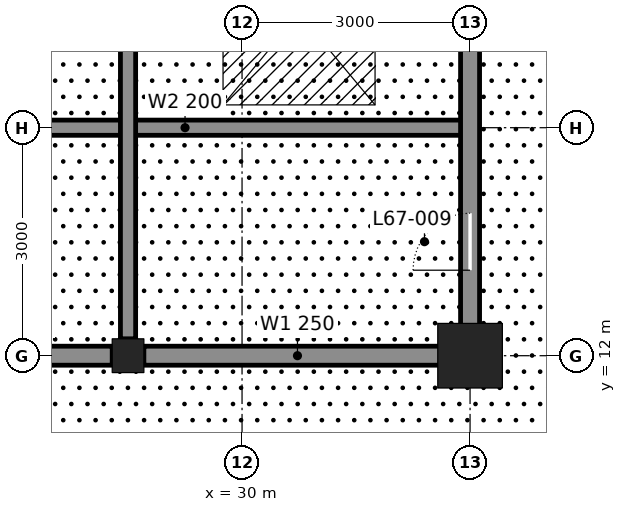
"""IFC4 building model, lengths in metres.
Left out: names, types, materials, properties, quantities, classifications, styles, units other than length and angle.
Written with IfcOpenShell. Run it as: python <this file> out.ifc"""

import sys

from ifc_helpers import new_model, si_unit, direction, frame, frame_2d, origin, origin_2d, place, context, subcontext, project, spatial, rectangle, hollow_rectangle, i_section, extrude, element, fill, save


model = new_model("IFC4")
c1 = context("Model", 3, precision=1e-05, world=origin(), true_north=direction((0.0, 1.0)))
c2 = subcontext(c1, "Body", "Model", "MODEL_VIEW")
j1 = project(units=[si_unit("LENGTHUNIT", "METRE"), si_unit("PLANEANGLEUNIT", "RADIAN")], contexts=[c1])
p1 = place(None, origin())
s1 = spatial("IfcSite", under=j1, at=p1, CompositionType="ELEMENT")
p2 = place(p1, origin())
s2 = spatial("IfcBuilding", under=s1, at=p2, CompositionType="ELEMENT")
p3 = place(p2, frame((0.0, 0.0, 300.0)))
s3 = spatial("IfcBuildingStorey", under=s2, at=p3, CompositionType="ELEMENT", Elevation=300.0)
p4 = place(p3, frame((28.5, 12.0, 0.0), z_axis=(0.0, 0.0, 1.0), x_axis=(1.0, 0.0, 0.0)))
e1 = element("IfcColumn", 1, at=p4, inside=s3, PredefinedType="COLUMN", context=c2, shape_type="SweptSolid", body=[
    extrude(i_section(OverallWidth=0.417, OverallDepth=0.445, WebThickness=0.039, FlangeThickness=0.063, at=origin_2d()), origin(), (0.0, 0.0, 1.0), 6.0),
])
p5 = place(p3, frame((33.0, 12.0, 0.0), z_axis=(0.0, 0.0, 1.0), x_axis=(1.0, 0.0, 0.0)))
e2 = element("IfcColumn", 2, at=p5, inside=s3, PredefinedType="COLUMN", context=c2, shape_type="SweptSolid", body=[
    extrude(hollow_rectangle(XDim=0.85, YDim=0.85, WallThickness=0.085, at=origin_2d()), origin(), (0.0, 0.0, 1.0), 6.0),
])
p6 = place(p3, frame((25.708, 12.0, 0.0), z_axis=(0.0, 0.0, 1.0), x_axis=(1.0, 0.0, 0.0)))
e3 = element("IfcWall", 3, at=p6, inside=s3, PredefinedType="SOLIDWALL", context=c2, shape_type="SweptSolid", body=[
    extrude(rectangle(XDim=2.583, YDim=0.25, at=frame_2d((1.292, 0.0))), origin(), (0.0, 0.0, 1.0), 4.981),
])
p7 = place(p3, frame((28.708, 12.0, 0.0), z_axis=(0.0, 0.0, 1.0), x_axis=(1.0, 0.0, 0.0)))
e4 = element("IfcWall", 4, at=p7, inside=s3, PredefinedType="SOLIDWALL", context=c2, shape_type="SweptSolid", body=[
    extrude(rectangle(XDim=4.042, YDim=0.25, at=frame_2d((2.021, 0.0))), origin(), (0.0, 0.0, 1.0), 4.981),
])
p8 = place(p3, frame((25.5, 15.0, 0.0), z_axis=(0.0, 0.0, 1.0), x_axis=(1.0, 0.0, 0.0)))
e5 = element("IfcWall", 5, at=p8, inside=s3, PredefinedType="SOLIDWALL", context=c2, shape_type="SweptSolid", body=[
    extrude(rectangle(XDim=7.5, YDim=0.2, at=frame_2d((3.75, 0.0))), origin(), (0.0, 0.0, 1.0), 5.84),
])
p9 = place(p3, frame((28.5, 12.222, 0.0), z_axis=(0.0, 0.0, 1.0), x_axis=(0.0, 1.0, 0.0)))
e6 = element("IfcWall", 6, at=p9, inside=s3, PredefinedType="SOLIDWALL", context=c2, shape_type="SweptSolid", body=[
    extrude(rectangle(XDim=8.555, YDim=0.2, at=frame_2d((4.278, 0.0))), origin(), (0.0, 0.0, 1.0), 4.913),
])
p10 = place(p3, frame((33.0, 12.25, 0.0), z_axis=(0.0, 0.0, 1.0), x_axis=(0.0, 1.0, 0.0)))
e7 = element("IfcWall", 7, at=p10, inside=s3, PredefinedType="SOLIDWALL", context=c2, shape_type="SweptSolid", body=[
    extrude(rectangle(XDim=8.528, YDim=0.25, at=frame_2d((4.264, 0.0))), origin(), (0.0, 0.0, 1.0), 4.913),
])
p11 = place(p10, frame((6.65, 0.0, 0.0)))
e8 = element("IfcOpeningElement", 8, at=p11, cuts=e7, PredefinedType="OPENING", context=c2, shape_type="SweptSolid", body=[
    extrude(rectangle(XDim=1.2, YDim=2.1, at=frame_2d((0.6, 1.05))), frame((0.0, 0.135, 0.0), z_axis=(0.0, -1.0, 0.0), x_axis=(1.0, 0.0, 0.0)), (0.0, 0.0, 1.0), 0.27),
])
p12 = place(p10, frame((0.875, 0.0, 0.0)))
e9 = element("IfcOpeningElement", 9, at=p12, cuts=e7, PredefinedType="OPENING", context=c2, shape_type="SweptSolid", body=[
    extrude(rectangle(XDim=0.75, YDim=2.1, at=frame_2d((0.375, 1.05))), frame((0.0, 0.135, 0.0), z_axis=(0.0, -1.0, 0.0), x_axis=(1.0, 0.0, 0.0)), (0.0, 0.0, 1.0), 0.27),
])
p13 = place(p12, origin())
e10 = element("IfcDoor", 10, at=p13, inside=s3, OperationType="SINGLE_SWING_LEFT", PredefinedType="DOOR", context=c2, shape_type="SweptSolid", body=[
    extrude(rectangle(XDim=0.75, YDim=2.1, at=frame_2d((0.375, 1.05))), frame((0.0, 0.025, 0.0), z_axis=(0.0, -1.0, 0.0), x_axis=(1.0, 0.0, 0.0)), (0.0, 0.0, 1.0), 0.05),
])
fill(e9, e10)
save(model, sys.argv[1])
